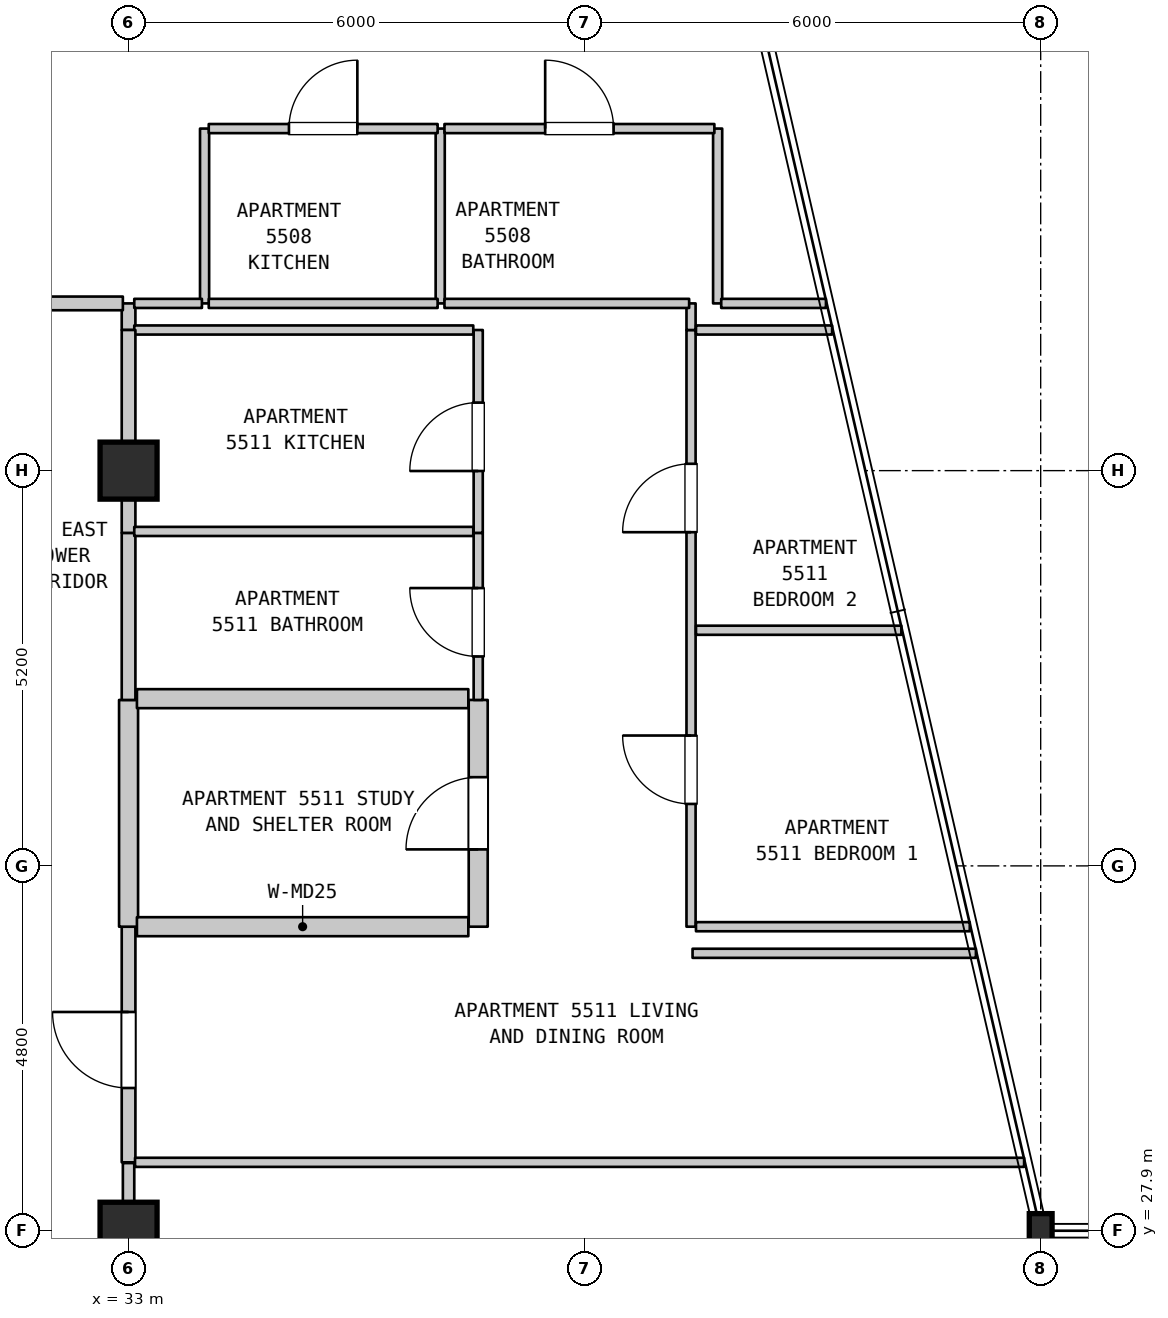
"""IFC4 building model, lengths in metres.
Left out: names, types, materials, properties, quantities, classifications, styles, units other than length and angle.
Written with IfcOpenShell. Run it as: python <this file> out.ifc"""

import sys

from ifc_helpers import new_model, si_unit, direction, frame, frame_2d, origin, origin_2d, place, context, subcontext, project, spatial, rectangle, i_section, extrude, element, fill, save


model = new_model("IFC4")
c1 = context("Model", 3, precision=1e-05, world=origin(), true_north=direction((0.0, 1.0)))
c2 = subcontext(c1, "Body", "Model", "MODEL_VIEW")
j1 = project(units=[si_unit("LENGTHUNIT", "METRE"), si_unit("PLANEANGLEUNIT", "RADIAN")], contexts=[c1])
p1 = place(None, origin())
s1 = spatial("IfcSite", under=j1, at=p1, CompositionType="ELEMENT")
p2 = place(p1, origin())
s2 = spatial("IfcBuilding", under=s1, at=p2, CompositionType="ELEMENT")
p3 = place(p2, frame((0.0, 0.0, 222.8)))
s3 = spatial("IfcBuildingStorey", under=s2, at=p3, CompositionType="ELEMENT", Elevation=222.8)
for number, where, z_axis, x_axis in (
    (1, (33.0, 27.9, 0.0), (0.0, 0.0, 1.0), (1.0, 0.0, 0.0)),
    (2, (33.0, 37.9, 0.0), (0.0, 0.0, 1.0), (1.0, 0.0, 0.0)),
):
    element("IfcColumn", number, at=place(p3, frame(where, z_axis=z_axis, x_axis=x_axis)), inside=s3, PredefinedType="COLUMN", context=c2, shape_type="SweptSolid", body=[
        extrude(rectangle(XDim=0.75, YDim=0.75, at=origin_2d()), origin(), (0.0, 0.0, 1.0), 3.7),
    ])
p4 = place(p3, frame((45.0, 27.9, 0.0), z_axis=(0.0, 0.0, 1.0), x_axis=(1.0, 0.0, 0.0)))
e3 = element("IfcColumn", 3, at=p4, inside=s3, PredefinedType="COLUMN", context=c2, shape_type="SweptSolid", body=[
    extrude(i_section(OverallWidth=0.3, OverallDepth=0.45, WebThickness=0.014, FlangeThickness=0.026, FilletRadius=0.027, at=origin_2d()), origin(), (0.0, 0.0, 1.0), 3.7),
])
p5 = place(p3, frame((33.0, 19.51, 0.0), z_axis=(0.0, 0.0, 1.0), x_axis=(0.0, 1.0, 0.0)))
e4 = element("IfcWall", 4, at=p5, inside=s3, PredefinedType="STANDARD", context=c2, shape_type="SweptSolid", body=[
    extrude(rectangle(XDim=8.39, YDim=0.15, at=frame_2d((4.195, 0.0))), origin(), (0.0, 0.0, 1.0), 2.99),
])
p6 = place(p5, frame((4.069, 0.0, 0.0)))
e5 = element("IfcOpeningElement", 5, at=p6, cuts=e4, PredefinedType="OPENING", context=c2, shape_type="SweptSolid", body=[
    extrude(rectangle(XDim=1.0, YDim=2.15, at=frame_2d((0.5, 1.075))), frame((0.0, 0.085, 0.0), z_axis=(0.0, -1.0, 0.0), x_axis=(1.0, 0.0, 0.0)), (0.0, 0.0, 1.0), 0.17),
])
p7 = place(p3, frame((33.0, 28.8, 0.0), z_axis=(0.0, 0.0, 1.0), x_axis=(0.0, 1.0, 0.0)))
e6 = element("IfcWall", 6, at=p7, inside=s3, PredefinedType="STANDARD", context=c2, shape_type="SweptSolid", body=[
    extrude(rectangle(XDim=3.1, YDim=0.18, at=frame_2d((1.55, 0.0))), origin(), (0.0, 0.0, 1.0), 2.89),
])
p8 = place(p7, frame((0.978, 0.0, 0.0)))
e7 = element("IfcOpeningElement", 7, at=p8, cuts=e6, PredefinedType="OPENING", context=c2, shape_type="SweptSolid", body=[
    extrude(rectangle(XDim=1.0, YDim=2.15, at=frame_2d((0.5, 1.075))), frame((0.0, 0.1, 0.0), z_axis=(0.0, -1.0, 0.0), x_axis=(1.0, 0.0, 0.0)), (0.0, 0.0, 1.0), 0.2),
])
p9 = place(p3, frame((33.0, 31.9, 0.0), z_axis=(0.0, 0.0, 1.0), x_axis=(0.0, 1.0, 0.0)))
e8 = element("IfcWall", 8, at=p9, inside=s3, PredefinedType="STANDARD", context=c2, shape_type="SweptSolid", body=[
    extrude(rectangle(XDim=2.983, YDim=0.25, at=frame_2d((1.492, 0.0))), origin(), (0.0, 0.0, 1.0), 2.89),
])
p10 = place(p3, frame((33.0, 34.883, 0.0), z_axis=(0.0, 0.0, 1.0), x_axis=(0.0, 1.0, 0.0)))
e9 = element("IfcWall", 9, at=p10, inside=s3, PredefinedType="STANDARD", context=c2, shape_type="SweptSolid", body=[
    extrude(rectangle(XDim=2.198, YDim=0.18, at=frame_2d((1.099, 0.0))), origin(), (0.0, 0.0, 1.0), 2.89),
])
p11 = place(p3, frame((33.0, 37.081, 0.0), z_axis=(0.0, 0.0, 1.0), x_axis=(0.0, 1.0, 0.0)))
e10 = element("IfcWall", 10, at=p11, inside=s3, PredefinedType="STANDARD", context=c2, shape_type="SweptSolid", body=[
    extrude(rectangle(XDim=0.819, YDim=0.18, at=frame_2d((0.409, 0.0))), origin(), (0.0, 0.0, 1.0), 2.89),
])
p12 = place(p3, frame((33.0, 39.75, 0.0), z_axis=(0.0, 0.0, 1.0), x_axis=(0.0, 1.0, 0.0)))
e11 = element("IfcWall", 11, at=p12, inside=s3, PredefinedType="STANDARD", context=c2, shape_type="SweptSolid", body=[
    extrude(rectangle(XDim=0.35, YDim=0.18, at=frame_2d((0.175, 0.0))), origin(), (0.0, 0.0, 1.0), 3.39),
])
for number, where, z_axis, x_axis in (
    (12, (34.0, 40.1, 0.0), (0.0, 0.0, 1.0), (0.0, 1.0, 0.0)),
    (13, (37.1, 40.1, 0.0), (0.0, 0.0, 1.0), (0.0, 1.0, 0.0)),
):
    element("IfcWall", number, at=place(p3, frame(where, z_axis=z_axis, x_axis=x_axis)), inside=s3, PredefinedType="PARTITIONING", context=c2, shape_type="SweptSolid", body=[
        extrude(rectangle(XDim=2.3, YDim=0.12, at=frame_2d((1.15, 0.0))), origin(), (0.0, 0.0, 1.0), 3.39),
    ])
p13 = place(p3, frame((37.6, 31.9, 0.0), z_axis=(0.0, 0.0, 1.0), x_axis=(0.0, 1.0, 0.0)))
e14 = element("IfcWall", 14, at=p13, inside=s3, PredefinedType="STANDARD", context=c2, shape_type="SweptSolid", body=[
    extrude(rectangle(XDim=2.983, YDim=0.25, at=frame_2d((1.492, 0.0))), origin(), (0.0, 0.0, 1.0), 3.39),
])
p14 = place(p13, frame((1.017, 0.0, 0.0)))
e15 = element("IfcOpeningElement", 15, at=p14, cuts=e14, PredefinedType="OPENING", context=c2, shape_type="SweptSolid", body=[
    extrude(rectangle(XDim=0.95, YDim=2.15, at=frame_2d((0.475, 1.075))), frame((0.0, 0.135, 0.0), z_axis=(0.0, -1.0, 0.0), x_axis=(1.0, 0.0, 0.0)), (0.0, 0.0, 1.0), 0.27),
])
p15 = place(p3, frame((37.6, 34.883, 0.0), z_axis=(0.0, 0.0, 1.0), x_axis=(0.0, 1.0, 0.0)))
e16 = element("IfcWall", 16, at=p15, inside=s3, PredefinedType="PARTITIONING", context=c2, shape_type="SweptSolid", body=[
    extrude(rectangle(XDim=2.198, YDim=0.12, at=frame_2d((1.099, 0.0))), origin(), (0.0, 0.0, 1.0), 3.39),
])
p16 = place(p15, frame((0.572, 0.0, 0.0)))
e17 = element("IfcOpeningElement", 17, at=p16, cuts=e16, PredefinedType="OPENING", context=c2, shape_type="SweptSolid", body=[
    extrude(rectangle(XDim=0.9, YDim=2.1, at=frame_2d((0.45, 1.05))), frame((0.0, 0.07, 0.0), z_axis=(0.0, -1.0, 0.0), x_axis=(1.0, 0.0, 0.0)), (0.0, 0.0, 1.0), 0.14),
])
p17 = place(p3, frame((37.6, 37.081, 0.0), z_axis=(0.0, 0.0, 1.0), x_axis=(0.0, 1.0, 0.0)))
e18 = element("IfcWall", 18, at=p17, inside=s3, PredefinedType="PARTITIONING", context=c2, shape_type="SweptSolid", body=[
    extrude(rectangle(XDim=2.669, YDim=0.12, at=frame_2d((1.334, 0.0))), origin(), (0.0, 0.0, 1.0), 3.39),
])
p18 = place(p17, frame((0.814, 0.0, 0.0)))
e19 = element("IfcOpeningElement", 19, at=p18, cuts=e18, PredefinedType="OPENING", context=c2, shape_type="SweptSolid", body=[
    extrude(rectangle(XDim=0.9, YDim=2.15, at=frame_2d((0.45, 1.075))), frame((0.0, 0.07, 0.0), z_axis=(0.0, -1.0, 0.0), x_axis=(1.0, 0.0, 0.0)), (0.0, 0.0, 1.0), 0.14),
])
p19 = place(p3, frame((40.4, 31.9, 0.0), z_axis=(0.0, 0.0, 1.0), x_axis=(0.0, 1.0, 0.0)))
e20 = element("IfcWall", 20, at=p19, inside=s3, PredefinedType="PARTITIONING", context=c2, shape_type="SweptSolid", body=[
    extrude(rectangle(XDim=7.85, YDim=0.12, at=frame_2d((3.925, 0.0))), origin(), (0.0, 0.0, 1.0), 3.39),
])
p20 = place(p19, frame((1.615, 0.0, 0.0)))
e21 = element("IfcOpeningElement", 21, at=p20, cuts=e20, PredefinedType="OPENING", context=c2, shape_type="SweptSolid", body=[
    extrude(rectangle(XDim=0.9, YDim=2.15, at=frame_2d((0.45, 1.075))), frame((0.0, 0.07, 0.0), z_axis=(0.0, -1.0, 0.0), x_axis=(1.0, 0.0, 0.0)), (0.0, 0.0, 1.0), 0.14),
])
p21 = place(p19, frame((5.19, 0.0, 0.0)))
e22 = element("IfcOpeningElement", 22, at=p21, cuts=e20, PredefinedType="OPENING", context=c2, shape_type="SweptSolid", body=[
    extrude(rectangle(XDim=0.9, YDim=2.15, at=frame_2d((0.45, 1.075))), frame((0.0, 0.07, 0.0), z_axis=(0.0, -1.0, 0.0), x_axis=(1.0, 0.0, 0.0)), (0.0, 0.0, 1.0), 0.14),
])
p22 = place(p3, frame((40.4, 39.75, 0.0), z_axis=(0.0, 0.0, 1.0), x_axis=(0.0, 1.0, 0.0)))
e23 = element("IfcWall", 23, at=p22, inside=s3, PredefinedType="PARTITIONING", context=c2, shape_type="SweptSolid", body=[
    extrude(rectangle(XDim=0.35, YDim=0.12, at=frame_2d((0.175, 0.0))), origin(), (0.0, 0.0, 1.0), 3.39),
])
p23 = place(p3, frame((40.75, 40.1, 0.0), z_axis=(0.0, 0.0, 1.0), x_axis=(0.0, 1.0, 0.0)))
e24 = element("IfcWall", 24, at=p23, inside=s3, PredefinedType="PARTITIONING", context=c2, shape_type="SweptSolid", body=[
    extrude(rectangle(XDim=2.3, YDim=0.12, at=frame_2d((1.15, 0.0))), origin(), (0.0, 0.0, 1.0), 3.39),
])
p24 = place(p3, frame((33.085, 28.8, 0.0), z_axis=(0.0, 0.0, 1.0), x_axis=(1.0, 0.0, 0.0)))
e25 = element("IfcWall", 25, at=p24, inside=s3, PredefinedType="PARTITIONING", context=c2, shape_type="SweptSolid", body=[
    extrude(rectangle(XDim=11.697, YDim=0.12, at=frame_2d((5.849, 0.0))), origin(), (0.0, 0.0, 1.0), 3.39),
])
p25 = place(p3, frame((40.42, 31.55, 0.0), z_axis=(0.0, 0.0, 1.0), x_axis=(1.0, 0.0, 0.0)))
e26 = element("IfcWall", 26, at=p25, inside=s3, PredefinedType="PARTITIONING", context=c2, shape_type="SweptSolid", body=[
    extrude(rectangle(XDim=3.728, YDim=0.12, at=frame_2d((1.864, 0.0))), origin(), (0.0, 0.0, 1.0), 3.39),
])
p26 = place(p3, frame((33.11, 31.9, 0.0), z_axis=(0.0, 0.0, 1.0), x_axis=(1.0, 0.0, 0.0)))
e27 = element("IfcWall", 27, at=p26, inside=s3, PredefinedType="STANDARD", context=c2, shape_type="SweptSolid", body=[
    extrude(rectangle(XDim=4.36, YDim=0.25, at=frame_2d((2.18, 0.0))), origin(), (0.0, 0.0, 1.0), 3.39),
])
p27 = place(p3, frame((40.465, 31.9, 0.0), z_axis=(0.0, 0.0, 1.0), x_axis=(1.0, 0.0, 0.0)))
e28 = element("IfcWall", 28, at=p27, inside=s3, PredefinedType="PARTITIONING", context=c2, shape_type="SweptSolid", body=[
    extrude(rectangle(XDim=3.602, YDim=0.12, at=frame_2d((1.801, 0.0))), origin(), (0.0, 0.0, 1.0), 3.39),
])
p28 = place(p3, frame((33.11, 34.9, 0.0), z_axis=(0.0, 0.0, 1.0), x_axis=(1.0, 0.0, 0.0)))
e29 = element("IfcWall", 29, at=p28, inside=s3, PredefinedType="STANDARD", context=c2, shape_type="SweptSolid", body=[
    extrude(rectangle(XDim=4.36, YDim=0.25, at=frame_2d((2.18, 0.0))), origin(), (0.0, 0.0, 1.0), 3.39),
])
p29 = place(p3, frame((40.465, 35.8, 0.0), z_axis=(0.0, 0.0, 1.0), x_axis=(1.0, 0.0, 0.0)))
e30 = element("IfcWall", 30, at=p29, inside=s3, PredefinedType="PARTITIONING", context=c2, shape_type="SweptSolid", body=[
    extrude(rectangle(XDim=2.702, YDim=0.12, at=frame_2d((1.351, 0.0))), origin(), (0.0, 0.0, 1.0), 3.39),
])
for number, where, z_axis, x_axis in (
    (31, (33.075, 37.1, 0.0), (0.0, 0.0, 1.0), (1.0, 0.0, 0.0)),
    (32, (33.075, 39.75, 0.0), (0.0, 0.0, 1.0), (1.0, 0.0, 0.0)),
):
    element("IfcWall", number, at=place(p3, frame(where, z_axis=z_axis, x_axis=x_axis)), inside=s3, PredefinedType="PARTITIONING", context=c2, shape_type="SweptSolid", body=[
        extrude(rectangle(XDim=4.46, YDim=0.12, at=frame_2d((2.23, 0.0))), origin(), (0.0, 0.0, 1.0), 3.39),
    ])
p30 = place(p3, frame((40.465, 39.75, 0.0), z_axis=(0.0, 0.0, 1.0), x_axis=(1.0, 0.0, 0.0)))
e33 = element("IfcWall", 33, at=p30, inside=s3, PredefinedType="PARTITIONING", context=c2, shape_type="SweptSolid", body=[
    extrude(rectangle(XDim=1.791, YDim=0.12, at=frame_2d((0.896, 0.0))), origin(), (0.0, 0.0, 1.0), 3.39),
])
p31 = place(p3, frame((28.595, 40.1, 0.0), z_axis=(0.0, 0.0, 1.0), x_axis=(1.0, 0.0, 0.0)))
e34 = element("IfcWall", 34, at=p31, inside=s3, PredefinedType="STANDARD", context=c2, shape_type="SweptSolid", body=[
    extrude(rectangle(XDim=4.33, YDim=0.18, at=frame_2d((2.165, 0.0))), origin(), (0.0, 0.0, 1.0), 3.39),
])
p32 = place(p31, frame((1.88, 0.0, 0.0)))
e35 = element("IfcOpeningElement", 35, at=p32, cuts=e34, PredefinedType="OPENING", context=c2, shape_type="SweptSolid", body=[
    extrude(rectangle(XDim=1.0, YDim=2.15, at=frame_2d((0.5, 1.075))), frame((0.0, 0.1, 0.0), z_axis=(0.0, -1.0, 0.0), x_axis=(1.0, 0.0, 0.0)), (0.0, 0.0, 1.0), 0.2),
])
p33 = place(p3, frame((33.075, 40.1, 0.0), z_axis=(0.0, 0.0, 1.0), x_axis=(1.0, 0.0, 0.0)))
e36 = element("IfcWall", 36, at=p33, inside=s3, PredefinedType="PARTITIONING", context=c2, shape_type="SweptSolid", body=[
    extrude(rectangle(XDim=0.89, YDim=0.12, at=frame_2d((0.445, 0.0))), origin(), (0.0, 0.0, 1.0), 3.39),
])
p34 = place(p3, frame((34.055, 40.1, 0.0), z_axis=(0.0, 0.0, 1.0), x_axis=(1.0, 0.0, 0.0)))
e37 = element("IfcWall", 37, at=p34, inside=s3, PredefinedType="PARTITIONING", context=c2, shape_type="SweptSolid", body=[
    extrude(rectangle(XDim=3.011, YDim=0.12, at=frame_2d((1.505, 0.0))), origin(), (0.0, 0.0, 1.0), 3.39),
])
p35 = place(p3, frame((37.156, 40.1, 0.0), z_axis=(0.0, 0.0, 1.0), x_axis=(1.0, 0.0, 0.0)))
e38 = element("IfcWall", 38, at=p35, inside=s3, PredefinedType="PARTITIONING", context=c2, shape_type="SweptSolid", body=[
    extrude(rectangle(XDim=3.219, YDim=0.12, at=frame_2d((1.609, 0.0))), origin(), (0.0, 0.0, 1.0), 3.39),
])
p36 = place(p3, frame((40.797, 40.1, 0.0), z_axis=(0.0, 0.0, 1.0), x_axis=(1.0, 0.0, 0.0)))
e39 = element("IfcWall", 39, at=p36, inside=s3, PredefinedType="PARTITIONING", context=c2, shape_type="SweptSolid", body=[
    extrude(rectangle(XDim=1.378, YDim=0.12, at=frame_2d((0.689, 0.0))), origin(), (0.0, 0.0, 1.0), 3.39),
])
p37 = place(p3, frame((34.055, 42.4, 0.0), z_axis=(0.0, 0.0, 1.0), x_axis=(1.0, 0.0, 0.0)))
e40 = element("IfcWall", 40, at=p37, inside=s3, PredefinedType="PARTITIONING", context=c2, shape_type="SweptSolid", body=[
    extrude(rectangle(XDim=3.011, YDim=0.12, at=frame_2d((1.505, 0.0))), origin(), (0.0, 0.0, 1.0), 3.39),
])
p38 = place(p37, frame((1.055, 0.0, 0.0)))
e41 = element("IfcOpeningElement", 41, at=p38, cuts=e40, PredefinedType="OPENING", context=c2, shape_type="SweptSolid", body=[
    extrude(rectangle(XDim=0.9, YDim=2.15, at=frame_2d((0.45, 1.075))), frame((0.0, 0.07, 0.0), z_axis=(0.0, -1.0, 0.0), x_axis=(1.0, 0.0, 0.0)), (0.0, 0.0, 1.0), 0.14),
])
p39 = place(p3, frame((37.156, 42.4, 0.0), z_axis=(0.0, 0.0, 1.0), x_axis=(1.0, 0.0, 0.0)))
e42 = element("IfcWall", 42, at=p39, inside=s3, PredefinedType="PARTITIONING", context=c2, shape_type="SweptSolid", body=[
    extrude(rectangle(XDim=3.551, YDim=0.12, at=frame_2d((1.775, 0.0))), origin(), (0.0, 0.0, 1.0), 3.39),
])
p40 = place(p39, frame((1.325, 0.0, 0.0)))
e43 = element("IfcOpeningElement", 43, at=p40, cuts=e42, PredefinedType="OPENING", context=c2, shape_type="SweptSolid", body=[
    extrude(rectangle(XDim=0.9, YDim=2.1, at=frame_2d((0.45, 1.05))), frame((0.0, 0.07, 0.0), z_axis=(0.0, -1.0, 0.0), x_axis=(1.0, 0.0, 0.0)), (0.0, 0.0, 1.0), 0.14),
])
p41 = place(p3, frame((33.0, 27.9, 0.0), z_axis=(0.0, 0.0, 1.0), x_axis=(0.0, 1.0, 0.0)))
e44 = element("IfcWall", 44, at=p41, inside=s3, PredefinedType="STANDARD", context=c2, shape_type="SweptSolid", body=[
    extrude(rectangle(XDim=0.89, YDim=0.15, at=frame_2d((0.445, 0.0))), origin(), (0.0, 0.0, 1.0), 2.89),
])
p42 = place(p3, frame((33.0, 37.9, 0.0), z_axis=(0.0, 0.0, 1.0), x_axis=(0.0, 1.0, 0.0)))
e45 = element("IfcWall", 45, at=p42, inside=s3, PredefinedType="STANDARD", context=c2, shape_type="SweptSolid", body=[
    extrude(rectangle(XDim=1.85, YDim=0.18, at=frame_2d((0.925, 0.0))), origin(), (0.0, 0.0, 1.0), 2.79),
])
p43 = place(p8, origin())
e46 = element("IfcDoor", 46, at=p43, inside=s3, OperationType="SINGLE_SWING_RIGHT", PredefinedType="DOOR", context=c2, shape_type="SweptSolid", body=[
    extrude(rectangle(XDim=1.0, YDim=2.15, at=frame_2d((0.5, 1.075))), frame((0.0, 0.025, 0.0), z_axis=(0.0, -1.0, 0.0), x_axis=(1.0, 0.0, 0.0)), (0.0, 0.0, 1.0), 0.05),
])
fill(e7, e46)
p44 = place(p14, origin())
e47 = element("IfcDoor", 47, at=p44, inside=s3, OperationType="SINGLE_SWING_LEFT", PredefinedType="DOOR", context=c2, shape_type="SweptSolid", body=[
    extrude(rectangle(XDim=0.95, YDim=2.15, at=frame_2d((0.475, 1.075))), frame((0.0, 0.025, 0.0), z_axis=(0.0, -1.0, 0.0), x_axis=(1.0, 0.0, 0.0)), (0.0, 0.0, 1.0), 0.05),
])
fill(e15, e47)
p45 = place(p16, origin())
e48 = element("IfcDoor", 48, at=p45, inside=s3, OperationType="SINGLE_SWING_RIGHT", PredefinedType="DOOR", context=c2, shape_type="SweptSolid", body=[
    extrude(rectangle(XDim=0.9, YDim=2.1, at=frame_2d((0.45, 1.05))), frame((0.0, 0.025, 0.0), z_axis=(0.0, -1.0, 0.0), x_axis=(1.0, 0.0, 0.0)), (0.0, 0.0, 1.0), 0.05),
])
fill(e17, e48)
p46 = place(p18, origin())
e49 = element("IfcDoor", 49, at=p46, inside=s3, OperationType="SINGLE_SWING_LEFT", PredefinedType="DOOR", context=c2, shape_type="SweptSolid", body=[
    extrude(rectangle(XDim=0.9, YDim=2.15, at=frame_2d((0.45, 1.075))), frame((0.0, 0.025, 0.0), z_axis=(0.0, -1.0, 0.0), x_axis=(1.0, 0.0, 0.0)), (0.0, 0.0, 1.0), 0.05),
])
fill(e19, e49)
p47 = place(p20, origin())
e50 = element("IfcDoor", 50, at=p47, inside=s3, OperationType="SINGLE_SWING_RIGHT", PredefinedType="DOOR", context=c2, shape_type="SweptSolid", body=[
    extrude(rectangle(XDim=0.9, YDim=2.15, at=frame_2d((0.45, 1.075))), frame((0.0, 0.025, 0.0), z_axis=(0.0, -1.0, 0.0), x_axis=(1.0, 0.0, 0.0)), (0.0, 0.0, 1.0), 0.05),
])
fill(e21, e50)
p48 = place(p21, origin())
e51 = element("IfcDoor", 51, at=p48, inside=s3, OperationType="SINGLE_SWING_LEFT", PredefinedType="DOOR", context=c2, shape_type="SweptSolid", body=[
    extrude(rectangle(XDim=0.9, YDim=2.15, at=frame_2d((0.45, 1.075))), frame((0.0, 0.025, 0.0), z_axis=(0.0, -1.0, 0.0), x_axis=(1.0, 0.0, 0.0)), (0.0, 0.0, 1.0), 0.05),
])
fill(e22, e51)
p49 = place(p38, origin())
e52 = element("IfcDoor", 52, at=p49, inside=s3, OperationType="SINGLE_SWING_RIGHT", PredefinedType="DOOR", context=c2, shape_type="SweptSolid", body=[
    extrude(rectangle(XDim=0.9, YDim=2.15, at=frame_2d((0.45, 1.075))), frame((0.0, 0.025, 0.0), z_axis=(0.0, -1.0, 0.0), x_axis=(1.0, 0.0, 0.0)), (0.0, 0.0, 1.0), 0.05),
])
fill(e41, e52)
p50 = place(p40, origin())
e53 = element("IfcDoor", 53, at=p50, inside=s3, OperationType="SINGLE_SWING_LEFT", PredefinedType="DOOR", context=c2, shape_type="SweptSolid", body=[
    extrude(rectangle(XDim=0.9, YDim=2.1, at=frame_2d((0.45, 1.05))), frame((0.0, 0.025, 0.0), z_axis=(0.0, -1.0, 0.0), x_axis=(1.0, 0.0, 0.0)), (0.0, 0.0, 1.0), 0.05),
])
fill(e43, e53)
save(model, sys.argv[1])
